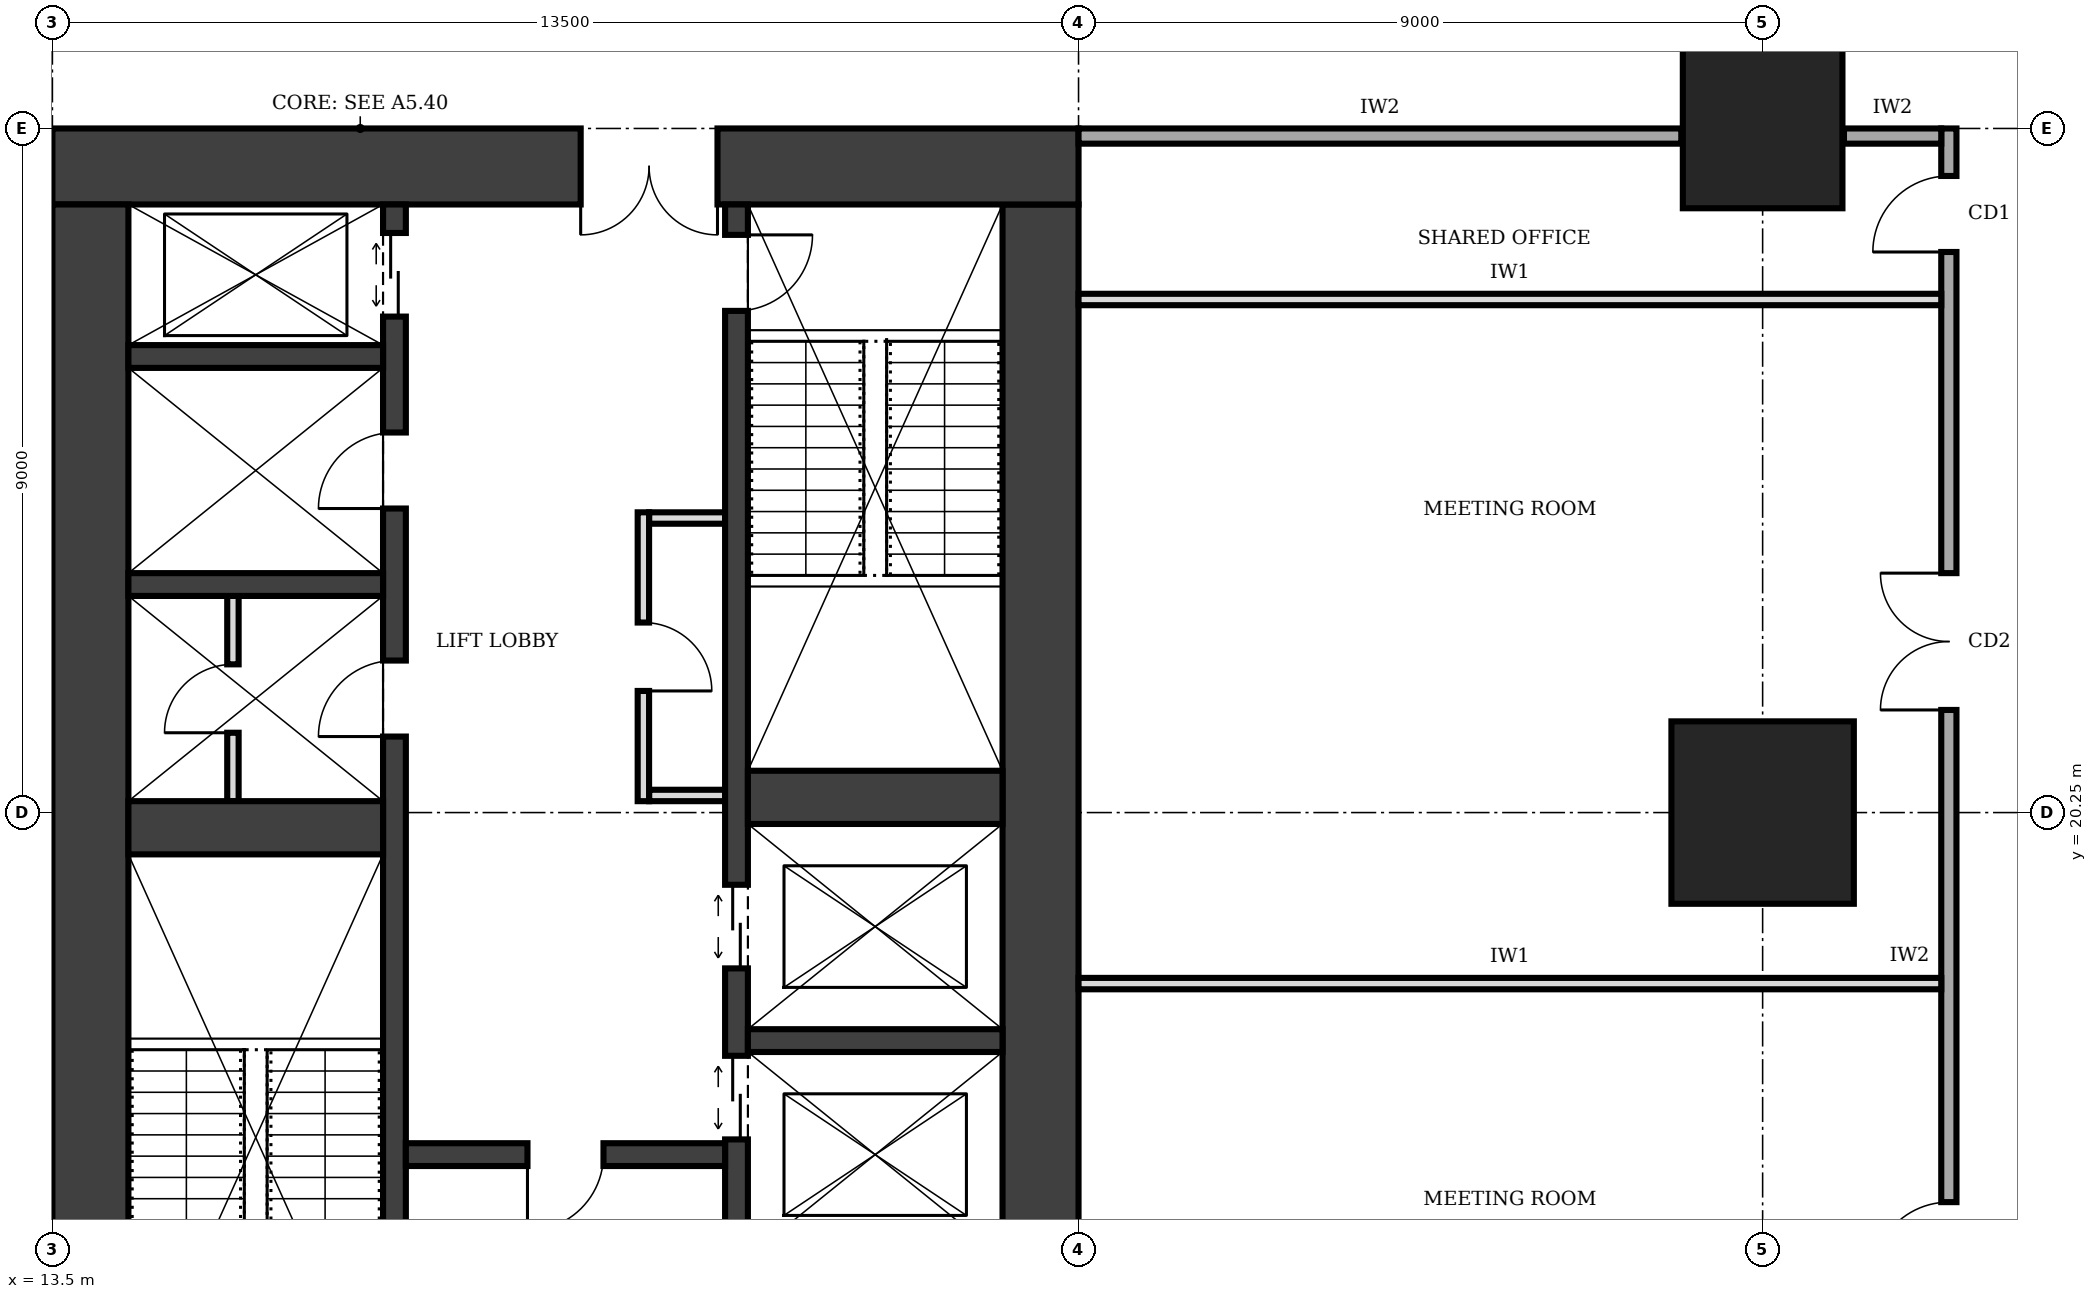
"""IFC4 building model, lengths in metres.
Left out: names, types, materials, properties, quantities, classifications, styles, units other than length and angle.
Written with IfcOpenShell. Run it as: python <this file> out.ifc"""

import sys

from ifc_helpers import new_model, si_unit, direction, frame, frame_2d, origin, origin_2d, place, context, subcontext, project, spatial, rectangle, extrude, element, fill, save


model = new_model("IFC4")
c1 = context("Model", 3, precision=1e-05, world=origin(), true_north=direction((0.0, 1.0)))
c2 = subcontext(c1, "Body", "Model", "MODEL_VIEW")
j1 = project(units=[si_unit("LENGTHUNIT", "METRE"), si_unit("PLANEANGLEUNIT", "RADIAN")], contexts=[c1])
p1 = place(None, origin())
s1 = spatial("IfcSite", under=j1, at=p1, CompositionType="ELEMENT")
p2 = place(p1, origin())
s2 = spatial("IfcBuilding", under=s1, at=p2, CompositionType="ELEMENT")
p3 = place(p2, frame((0.0, 0.0, 145.0)))
s3 = spatial("IfcBuildingStorey", under=s2, at=p3, CompositionType="ELEMENT", Elevation=145.0)
p4 = place(p3, frame((26.5, 12.25, 0.0), z_axis=(0.0, 0.0, 1.0), x_axis=(0.0, 1.0, 0.0)))
e1 = element("IfcWall", 1, at=p4, inside=s3, PredefinedType="SHEAR", context=c2, shape_type="SweptSolid", body=[
    extrude(rectangle(XDim=16.0, YDim=1.0, at=frame_2d((8.0, 0.0))), origin(), (0.0, 0.0, 1.0), 4.0),
])
p5 = place(p3, frame((27.0, 28.75, 0.0), z_axis=(0.0, 0.0, 1.0), x_axis=(-1.0, 0.0, 0.0)))
e2 = element("IfcWall", 2, at=p5, inside=s3, PredefinedType="SHEAR", context=c2, shape_type="SweptSolid", body=[
    extrude(rectangle(XDim=13.5, YDim=1.0, at=frame_2d((6.75, 0.0))), origin(), (0.0, 0.0, 1.0), 4.0),
])
p6 = place(p5, frame((4.75, 0.0, 0.0)))
e3 = element("IfcOpeningElement", 3, at=p6, cuts=e2, PredefinedType="OPENING", context=c2, shape_type="SweptSolid", body=[
    extrude(rectangle(XDim=1.8, YDim=2.1, at=frame_2d((0.9, 1.05))), frame((0.0, 0.51, 0.0), z_axis=(0.0, -1.0, 0.0), x_axis=(1.0, 0.0, 0.0)), (0.0, 0.0, 1.0), 1.02),
])
p7 = place(p3, frame((14.0, 28.25, 0.0), z_axis=(0.0, 0.0, 1.0), x_axis=(0.0, -1.0, 0.0)))
e4 = element("IfcWall", 4, at=p7, inside=s3, PredefinedType="SHEAR", context=c2, shape_type="SweptSolid", body=[
    extrude(rectangle(XDim=16.0, YDim=1.0, at=frame_2d((8.0, 0.0))), origin(), (0.0, 0.0, 1.0), 4.0),
])
p8 = place(p3, frame((18.0, 12.25, 0.0), z_axis=(0.0, 0.0, 1.0), x_axis=(0.0, 1.0, 0.0)))
e5 = element("IfcWall", 5, at=p8, inside=s3, PredefinedType="SHEAR", context=c2, shape_type="SweptSolid", body=[
    extrude(rectangle(XDim=16.0, YDim=0.3, at=frame_2d((8.0, 0.0))), origin(), (0.0, 0.0, 1.0), 4.0),
])
p9 = place(p8, frame((0.4, 0.0, 0.0)))
e6 = element("IfcOpeningElement", 6, at=p9, cuts=e5, PredefinedType="OPENING", context=c2, shape_type="SweptSolid", body=[
    extrude(rectangle(XDim=1.0, YDim=2.1, at=frame_2d((0.5, 1.05))), frame((0.0, 0.16, 0.0), z_axis=(0.0, -1.0, 0.0), x_axis=(1.0, 0.0, 0.0)), (0.0, 0.0, 1.0), 0.32),
])
p10 = place(p8, frame((14.525, 0.0, 0.0)))
e7 = element("IfcOpeningElement", 7, at=p10, cuts=e5, PredefinedType="OPENING", context=c2, shape_type="SweptSolid", body=[
    extrude(rectangle(XDim=1.1, YDim=2.1, at=frame_2d((0.55, 1.05))), frame((0.0, 0.16, 0.0), z_axis=(0.0, -1.0, 0.0), x_axis=(1.0, 0.0, 0.0)), (0.0, 0.0, 1.0), 0.32),
])
p11 = place(p8, frame((9.0, 0.0, 0.0)))
e8 = element("IfcOpeningElement", 8, at=p11, cuts=e5, PredefinedType="OPENING", context=c2, shape_type="SweptSolid", body=[
    extrude(rectangle(XDim=1.0, YDim=2.1, at=frame_2d((0.5, 1.05))), frame((0.0, 0.16, 0.0), z_axis=(0.0, -1.0, 0.0), x_axis=(1.0, 0.0, 0.0)), (0.0, 0.0, 1.0), 0.32),
])
p12 = place(p8, frame((12.0, 0.0, 0.0)))
e9 = element("IfcOpeningElement", 9, at=p12, cuts=e5, PredefinedType="OPENING", context=c2, shape_type="SweptSolid", body=[
    extrude(rectangle(XDim=1.0, YDim=2.1, at=frame_2d((0.5, 1.05))), frame((0.0, 0.16, 0.0), z_axis=(0.0, -1.0, 0.0), x_axis=(1.0, 0.0, 0.0)), (0.0, 0.0, 1.0), 0.32),
])
p13 = place(p3, frame((22.5, 12.25, 0.0), z_axis=(0.0, 0.0, 1.0), x_axis=(0.0, 1.0, 0.0)))
e10 = element("IfcWall", 10, at=p13, inside=s3, PredefinedType="SHEAR", context=c2, shape_type="SweptSolid", body=[
    extrude(rectangle(XDim=16.0, YDim=0.3, at=frame_2d((8.0, 0.0))), origin(), (0.0, 0.0, 1.0), 4.0),
])
p14 = place(p13, frame((14.6, 0.0, 0.0)))
e11 = element("IfcOpeningElement", 11, at=p14, cuts=e10, PredefinedType="OPENING", context=c2, shape_type="SweptSolid", body=[
    extrude(rectangle(XDim=1.0, YDim=2.1, at=frame_2d((0.5, 1.05))), frame((0.0, 0.16, 0.0), z_axis=(0.0, -1.0, 0.0), x_axis=(1.0, 0.0, 0.0)), (0.0, 0.0, 1.0), 0.32),
])
p15 = place(p13, frame((0.375, 0.0, 0.0)))
e12 = element("IfcOpeningElement", 12, at=p15, cuts=e10, PredefinedType="OPENING", context=c2, shape_type="SweptSolid", body=[
    extrude(rectangle(XDim=1.1, YDim=2.1, at=frame_2d((0.55, 1.05))), frame((0.0, 0.16, 0.0), z_axis=(0.0, -1.0, 0.0), x_axis=(1.0, 0.0, 0.0)), (0.0, 0.0, 1.0), 0.32),
])
p16 = place(p13, frame((3.7, 0.0, 0.0)))
e13 = element("IfcOpeningElement", 13, at=p16, cuts=e10, PredefinedType="OPENING", context=c2, shape_type="SweptSolid", body=[
    extrude(rectangle(XDim=1.1, YDim=2.1, at=frame_2d((0.55, 1.05))), frame((0.0, 0.16, 0.0), z_axis=(0.0, -1.0, 0.0), x_axis=(1.0, 0.0, 0.0)), (0.0, 0.0, 1.0), 0.32),
])
p17 = place(p13, frame((5.95, 0.0, 0.0)))
e14 = element("IfcOpeningElement", 14, at=p17, cuts=e10, PredefinedType="OPENING", context=c2, shape_type="SweptSolid", body=[
    extrude(rectangle(XDim=1.1, YDim=2.1, at=frame_2d((0.55, 1.05))), frame((0.0, 0.16, 0.0), z_axis=(0.0, -1.0, 0.0), x_axis=(1.0, 0.0, 0.0)), (0.0, 0.0, 1.0), 0.32),
])
p18 = place(p3, frame((14.5, 20.05, 0.0), z_axis=(0.0, 0.0, 1.0), x_axis=(1.0, 0.0, 0.0)))
e15 = element("IfcWall", 15, at=p18, inside=s3, PredefinedType="SHEAR", context=c2, shape_type="SweptSolid", body=[
    extrude(rectangle(XDim=3.35, YDim=0.7, at=frame_2d((1.675, 0.0))), origin(), (0.0, 0.0, 1.0), 4.0),
])
p19 = place(p3, frame((18.15, 15.75, 0.0), z_axis=(0.0, 0.0, 1.0), x_axis=(1.0, 0.0, 0.0)))
e16 = element("IfcWall", 16, at=p19, inside=s3, PredefinedType="SHEAR", context=c2, shape_type="SweptSolid", body=[
    extrude(rectangle(XDim=4.2, YDim=0.3, at=frame_2d((2.1, 0.0))), origin(), (0.0, 0.0, 1.0), 4.0),
])
p20 = place(p19, frame((1.6, 0.0, 0.0)))
e17 = element("IfcOpeningElement", 17, at=p20, cuts=e16, PredefinedType="OPENING", context=c2, shape_type="SweptSolid", body=[
    extrude(rectangle(XDim=1.0, YDim=2.1, at=frame_2d((0.5, 1.05))), frame((0.0, 0.16, 0.0), z_axis=(0.0, -1.0, 0.0), x_axis=(1.0, 0.0, 0.0)), (0.0, 0.0, 1.0), 0.32),
])
p21 = place(p3, frame((22.65, 17.25, 0.0), z_axis=(0.0, 0.0, 1.0), x_axis=(1.0, 0.0, 0.0)))
e18 = element("IfcWall", 18, at=p21, inside=s3, PredefinedType="SHEAR", context=c2, shape_type="SweptSolid", body=[
    extrude(rectangle(XDim=3.35, YDim=0.3, at=frame_2d((1.675, 0.0))), origin(), (0.0, 0.0, 1.0), 4.0),
])
p22 = place(p3, frame((22.65, 20.45, 0.0), z_axis=(0.0, 0.0, 1.0), x_axis=(1.0, 0.0, 0.0)))
e19 = element("IfcWall", 19, at=p22, inside=s3, PredefinedType="SHEAR", context=c2, shape_type="SweptSolid", body=[
    extrude(rectangle(XDim=3.35, YDim=0.7, at=frame_2d((1.675, 0.0))), origin(), (0.0, 0.0, 1.0), 4.0),
])
for number, where, z_axis, x_axis in (
    (20, (14.5, 23.25, 0.0), (0.0, 0.0, 1.0), (1.0, 0.0, 0.0)),
    (21, (14.5, 26.25, 0.0), (0.0, 0.0, 1.0), (1.0, 0.0, 0.0)),
):
    element("IfcWall", number, at=place(p3, frame(where, z_axis=z_axis, x_axis=x_axis)), inside=s3, PredefinedType="SHEAR", context=c2, shape_type="SweptSolid", body=[
        extrude(rectangle(XDim=3.35, YDim=0.3, at=frame_2d((1.675, 0.0))), origin(), (0.0, 0.0, 1.0), 4.0),
    ])
p23 = place(p3, frame((36.0, 20.25, 0.0), z_axis=(0.0, 0.0, 1.0), x_axis=(1.0, 0.0, 0.0)))
e22 = element("IfcColumn", 22, at=p23, inside=s3, PredefinedType="COLUMN", context=c2, shape_type="SweptSolid", body=[
    extrude(rectangle(XDim=2.4, YDim=2.4, at=origin_2d()), origin(), (0.0, 0.0, 1.0), 4.0),
])
p24 = place(p3, frame((36.0, 29.25, 0.0), z_axis=(0.0, 0.0, 1.0), x_axis=(1.0, 0.0, 0.0)))
e23 = element("IfcColumn", 23, at=p24, inside=s3, PredefinedType="COLUMN", context=c2, shape_type="SweptSolid", body=[
    extrude(rectangle(XDim=2.1, YDim=2.1, at=origin_2d()), origin(), (0.0, 0.0, 1.0), 4.0),
])
p25 = place(p3, frame((21.275, 20.4, 0.0), z_axis=(0.0, 0.0, 1.0), x_axis=(0.0, 1.0, 0.0)))
e24 = element("IfcWall", 24, at=p25, inside=s3, PredefinedType="PARTITIONING", context=c2, shape_type="SweptSolid", body=[
    extrude(rectangle(XDim=3.8, YDim=0.15, at=frame_2d((1.9, 0.0))), origin(), (0.0, 0.0, 1.0), 3.75),
])
p26 = place(p25, frame((1.45, 0.0, 0.0)))
e25 = element("IfcOpeningElement", 25, at=p26, cuts=e24, PredefinedType="OPENING", context=c2, shape_type="SweptSolid", body=[
    extrude(rectangle(XDim=0.9, YDim=2.1, at=frame_2d((0.45, 1.05))), frame((0.0, 0.085, 0.0), z_axis=(0.0, -1.0, 0.0), x_axis=(1.0, 0.0, 0.0)), (0.0, 0.0, 1.0), 0.17),
])
for number, where, z_axis, x_axis in (
    (26, (21.35, 20.475, 0.0), (0.0, 0.0, 1.0), (1.0, 0.0, 0.0)),
    (27, (21.35, 24.125, 0.0), (0.0, 0.0, 1.0), (1.0, 0.0, 0.0)),
):
    element("IfcWall", number, at=place(p3, frame(where, z_axis=z_axis, x_axis=x_axis)), inside=s3, PredefinedType="PARTITIONING", context=c2, shape_type="SweptSolid", body=[
        extrude(rectangle(XDim=1.0, YDim=0.15, at=frame_2d((0.5, 0.0))), origin(), (0.0, 0.0, 1.0), 3.75),
    ])
p27 = place(p3, frame((15.875, 20.4, 0.0), z_axis=(0.0, 0.0, 1.0), x_axis=(0.0, 1.0, 0.0)))
e28 = element("IfcWall", 28, at=p27, inside=s3, PredefinedType="PARTITIONING", context=c2, shape_type="SweptSolid", body=[
    extrude(rectangle(XDim=2.7, YDim=0.15, at=frame_2d((1.35, 0.0))), origin(), (0.0, 0.0, 1.0), 3.75),
])
p28 = place(p27, frame((0.9, 0.0, 0.0)))
e29 = element("IfcOpeningElement", 29, at=p28, cuts=e28, PredefinedType="OPENING", context=c2, shape_type="SweptSolid", body=[
    extrude(rectangle(XDim=0.9, YDim=2.1, at=frame_2d((0.45, 1.05))), frame((0.0, 0.085, 0.0), z_axis=(0.0, -1.0, 0.0), x_axis=(1.0, 0.0, 0.0)), (0.0, 0.0, 1.0), 0.17),
])
p29 = place(p3, frame((38.45, 11.25, 0.0), z_axis=(0.0, 0.0, 1.0), x_axis=(0.0, 1.0, 0.0)))
e30 = element("IfcWall", 30, at=p29, inside=s3, PredefinedType="SOLIDWALL", context=c2, shape_type="SweptSolid", body=[
    extrude(rectangle(XDim=18.0, YDim=0.2, at=frame_2d((9.0, 0.0))), origin(), (0.0, 0.0, 1.0), 3.75),
])
p30 = place(p29, frame((2.875, 0.0, 0.0)))
e31 = element("IfcOpeningElement", 31, at=p30, cuts=e30, PredefinedType="OPENING", context=c2, shape_type="SweptSolid", body=[
    extrude(rectangle(XDim=1.0, YDim=2.1, at=frame_2d((0.5, 1.05))), frame((0.0, 0.11, 0.0), z_axis=(0.0, -1.0, 0.0), x_axis=(1.0, 0.0, 0.0)), (0.0, 0.0, 1.0), 0.22),
])
p31 = place(p29, frame((10.35, 0.0, 0.0)))
e32 = element("IfcOpeningElement", 32, at=p31, cuts=e30, PredefinedType="OPENING", context=c2, shape_type="SweptSolid", body=[
    extrude(rectangle(XDim=1.8, YDim=2.1, at=frame_2d((0.9, 1.05))), frame((0.0, 0.11, 0.0), z_axis=(0.0, -1.0, 0.0), x_axis=(1.0, 0.0, 0.0)), (0.0, 0.0, 1.0), 0.22),
])
p32 = place(p29, frame((16.375, 0.0, 0.0)))
e33 = element("IfcOpeningElement", 33, at=p32, cuts=e30, PredefinedType="OPENING", context=c2, shape_type="SweptSolid", body=[
    extrude(rectangle(XDim=1.0, YDim=2.1, at=frame_2d((0.5, 1.05))), frame((0.0, 0.11, 0.0), z_axis=(0.0, -1.0, 0.0), x_axis=(1.0, 0.0, 0.0)), (0.0, 0.0, 1.0), 0.22),
])
p33 = place(p3, frame((27.0, 29.15, 0.0), z_axis=(0.0, 0.0, 1.0), x_axis=(1.0, 0.0, 0.0)))
e34 = element("IfcWall", 34, at=p33, inside=s3, PredefinedType="SOLIDWALL", context=c2, shape_type="SweptSolid", body=[
    extrude(rectangle(XDim=7.93, YDim=0.2, at=frame_2d((3.965, 0.0))), origin(), (0.0, 0.0, 1.0), 2.85),
])
p34 = place(p3, frame((37.07, 29.15, 0.0), z_axis=(0.0, 0.0, 1.0), x_axis=(1.0, 0.0, 0.0)))
e35 = element("IfcWall", 35, at=p34, inside=s3, PredefinedType="SOLIDWALL", context=c2, shape_type="SweptSolid", body=[
    extrude(rectangle(XDim=1.28, YDim=0.2, at=frame_2d((0.64, 0.0))), origin(), (0.0, 0.0, 1.0), 2.85),
])
for number, where, z_axis, x_axis in (
    (36, (27.0, 18.0, 0.0), (0.0, 0.0, 1.0), (1.0, 0.0, 0.0)),
    (37, (27.0, 27.0, 0.0), (0.0, 0.0, 1.0), (1.0, 0.0, 0.0)),
):
    element("IfcWall", number, at=place(p3, frame(where, z_axis=z_axis, x_axis=x_axis)), inside=s3, PredefinedType="PARTITIONING", context=c2, shape_type="SweptSolid", body=[
        extrude(rectangle(XDim=11.35, YDim=0.15, at=frame_2d((5.675, 0.0))), origin(), (0.0, 0.0, 1.0), 3.75),
    ])
p35 = place(p6, origin())
e38 = element("IfcDoor", 38, at=p35, inside=s3, OperationType="DOUBLE_DOOR_SINGLE_SWING", PredefinedType="DOOR", context=c2, shape_type="SweptSolid", body=[
    extrude(rectangle(XDim=1.8, YDim=2.1, at=frame_2d((0.9, 1.05))), frame((0.0, 0.025, 0.0), z_axis=(0.0, -1.0, 0.0), x_axis=(1.0, 0.0, 0.0)), (0.0, 0.0, 1.0), 0.05),
])
fill(e3, e38)
p36 = place(p20, frame((1.0, 0.0, 0.0), z_axis=(0.0, 0.0, 1.0), x_axis=(-1.0, 0.0, 0.0)))
e39 = element("IfcDoor", 39, at=p36, inside=s3, OperationType="SINGLE_SWING_RIGHT", PredefinedType="DOOR", context=c2, shape_type="SweptSolid", body=[
    extrude(rectangle(XDim=1.0, YDim=2.1, at=frame_2d((0.5, 1.05))), frame((0.0, 0.025, 0.0), z_axis=(0.0, -1.0, 0.0), x_axis=(1.0, 0.0, 0.0)), (0.0, 0.0, 1.0), 0.05),
])
fill(e17, e39)
p37 = place(p14, frame((1.0, 0.0, 0.0), z_axis=(0.0, 0.0, 1.0), x_axis=(-1.0, 0.0, 0.0)))
e40 = element("IfcDoor", 40, at=p37, inside=s3, OperationType="SINGLE_SWING_LEFT", PredefinedType="DOOR", context=c2, shape_type="SweptSolid", body=[
    extrude(rectangle(XDim=1.0, YDim=2.1, at=frame_2d((0.5, 1.05))), frame((0.0, 0.025, 0.0), z_axis=(0.0, -1.0, 0.0), x_axis=(1.0, 0.0, 0.0)), (0.0, 0.0, 1.0), 0.05),
])
fill(e11, e40)
p38 = place(p10, origin())
e41 = element("IfcDoor", 41, at=p38, inside=s3, OperationType="DOUBLE_DOOR_SLIDING", PredefinedType="DOOR", context=c2, shape_type="SweptSolid", body=[
    extrude(rectangle(XDim=1.1, YDim=2.1, at=frame_2d((0.55, 1.05))), frame((0.0, 0.025, 0.0), z_axis=(0.0, -1.0, 0.0), x_axis=(1.0, 0.0, 0.0)), (0.0, 0.0, 1.0), 0.05),
])
fill(e7, e41)
p39 = place(p16, origin())
e42 = element("IfcDoor", 42, at=p39, inside=s3, OperationType="DOUBLE_DOOR_SLIDING", PredefinedType="DOOR", context=c2, shape_type="SweptSolid", body=[
    extrude(rectangle(XDim=1.1, YDim=2.1, at=frame_2d((0.55, 1.05))), frame((0.0, 0.025, 0.0), z_axis=(0.0, -1.0, 0.0), x_axis=(1.0, 0.0, 0.0)), (0.0, 0.0, 1.0), 0.05),
])
fill(e13, e42)
p40 = place(p17, origin())
e43 = element("IfcDoor", 43, at=p40, inside=s3, OperationType="DOUBLE_DOOR_SLIDING", PredefinedType="DOOR", context=c2, shape_type="SweptSolid", body=[
    extrude(rectangle(XDim=1.1, YDim=2.1, at=frame_2d((0.55, 1.05))), frame((0.0, 0.025, 0.0), z_axis=(0.0, -1.0, 0.0), x_axis=(1.0, 0.0, 0.0)), (0.0, 0.0, 1.0), 0.05),
])
fill(e14, e43)
p41 = place(p26, frame((0.9, 0.0, 0.0), z_axis=(0.0, 0.0, 1.0), x_axis=(-1.0, 0.0, 0.0)))
e44 = element("IfcDoor", 44, at=p41, inside=s3, OperationType="SINGLE_SWING_RIGHT", PredefinedType="DOOR", context=c2, shape_type="SweptSolid", body=[
    extrude(rectangle(XDim=0.9, YDim=2.1, at=frame_2d((0.45, 1.05))), frame((0.0, 0.025, 0.0), z_axis=(0.0, -1.0, 0.0), x_axis=(1.0, 0.0, 0.0)), (0.0, 0.0, 1.0), 0.05),
])
fill(e25, e44)
p42 = place(p11, origin())
e45 = element("IfcDoor", 45, at=p42, inside=s3, OperationType="SINGLE_SWING_LEFT", PredefinedType="DOOR", context=c2, shape_type="SweptSolid", body=[
    extrude(rectangle(XDim=1.0, YDim=2.1, at=frame_2d((0.5, 1.05))), frame((0.0, 0.025, 0.0), z_axis=(0.0, -1.0, 0.0), x_axis=(1.0, 0.0, 0.0)), (0.0, 0.0, 1.0), 0.05),
])
fill(e8, e45)
p43 = place(p28, origin())
e46 = element("IfcDoor", 46, at=p43, inside=s3, OperationType="SINGLE_SWING_LEFT", PredefinedType="DOOR", context=c2, shape_type="SweptSolid", body=[
    extrude(rectangle(XDim=0.9, YDim=2.1, at=frame_2d((0.45, 1.05))), frame((0.0, 0.025, 0.0), z_axis=(0.0, -1.0, 0.0), x_axis=(1.0, 0.0, 0.0)), (0.0, 0.0, 1.0), 0.05),
])
fill(e29, e46)
p44 = place(p12, origin())
e47 = element("IfcDoor", 47, at=p44, inside=s3, OperationType="SINGLE_SWING_LEFT", PredefinedType="DOOR", context=c2, shape_type="SweptSolid", body=[
    extrude(rectangle(XDim=1.0, YDim=2.1, at=frame_2d((0.5, 1.05))), frame((0.0, 0.025, 0.0), z_axis=(0.0, -1.0, 0.0), x_axis=(1.0, 0.0, 0.0)), (0.0, 0.0, 1.0), 0.05),
])
fill(e9, e47)
p45 = place(p30, origin())
e48 = element("IfcDoor", 48, at=p45, inside=s3, OperationType="SINGLE_SWING_LEFT", PredefinedType="DOOR", context=c2, shape_type="SweptSolid", body=[
    extrude(rectangle(XDim=1.0, YDim=2.1, at=frame_2d((0.5, 1.05))), frame((0.0, 0.025, 0.0), z_axis=(0.0, -1.0, 0.0), x_axis=(1.0, 0.0, 0.0)), (0.0, 0.0, 1.0), 0.05),
])
fill(e31, e48)
p46 = place(p31, origin())
e49 = element("IfcDoor", 49, at=p46, inside=s3, OperationType="DOUBLE_DOOR_SINGLE_SWING", PredefinedType="DOOR", context=c2, shape_type="SweptSolid", body=[
    extrude(rectangle(XDim=1.8, YDim=2.1, at=frame_2d((0.9, 1.05))), frame((0.0, 0.025, 0.0), z_axis=(0.0, -1.0, 0.0), x_axis=(1.0, 0.0, 0.0)), (0.0, 0.0, 1.0), 0.05),
])
fill(e32, e49)
p47 = place(p32, origin())
e50 = element("IfcDoor", 50, at=p47, inside=s3, OperationType="SINGLE_SWING_LEFT", PredefinedType="DOOR", context=c2, shape_type="SweptSolid", body=[
    extrude(rectangle(XDim=1.0, YDim=2.1, at=frame_2d((0.5, 1.05))), frame((0.0, 0.025, 0.0), z_axis=(0.0, -1.0, 0.0), x_axis=(1.0, 0.0, 0.0)), (0.0, 0.0, 1.0), 0.05),
])
fill(e33, e50)
save(model, sys.argv[1])
